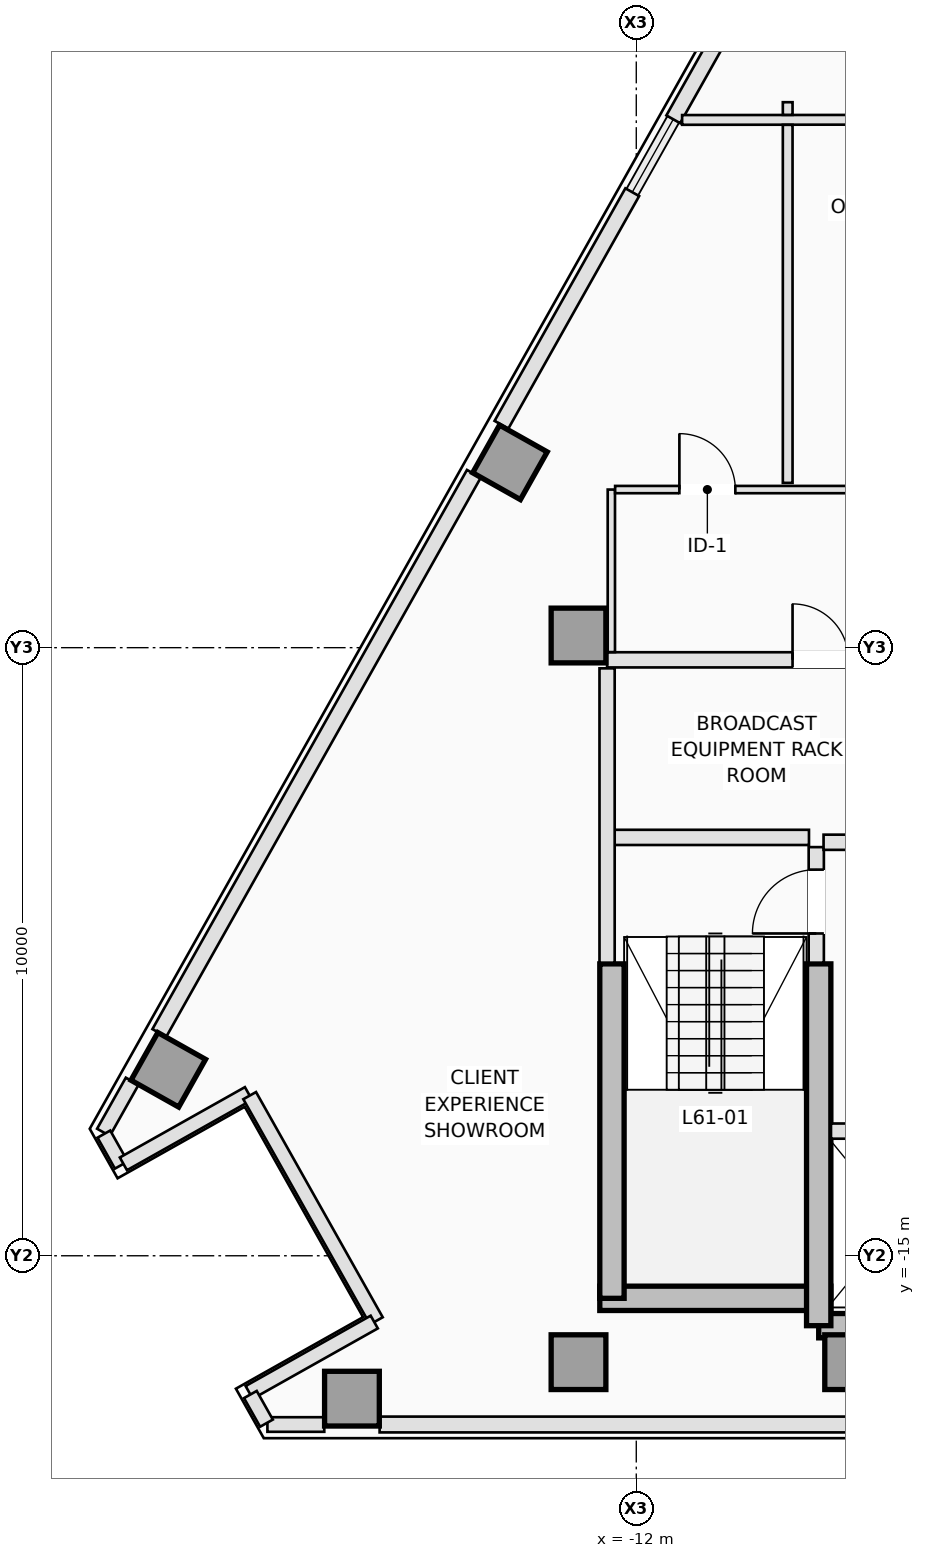
"""IFC4 building model, lengths in metres.
Left out: names, types, materials, properties, quantities, classifications, styles, units other than length and angle.
Written with IfcOpenShell. Run it as: python <this file> out.ifc"""

import sys

from ifc_helpers import new_model, si_unit, direction, frame, frame_2d, origin, origin_2d, place, context, subcontext, project, spatial, rectangle, extrude, element, fill, save


model = new_model("IFC4")
c1 = context("Model", 3, precision=1e-05, world=origin(), true_north=direction((0.0, 1.0)))
c2 = subcontext(c1, "Body", "Model", "MODEL_VIEW")
j1 = project(units=[si_unit("LENGTHUNIT", "METRE"), si_unit("PLANEANGLEUNIT", "RADIAN")], contexts=[c1])
p1 = place(None, origin())
s1 = spatial("IfcSite", under=j1, at=p1, CompositionType="ELEMENT")
p2 = place(p1, origin())
s2 = spatial("IfcBuilding", under=s1, at=p2, CompositionType="ELEMENT")
p3 = place(p2, frame((0.0, 0.0, 221.9)))
s3 = spatial("IfcBuildingStorey", under=s2, at=p3, CompositionType="ELEMENT", Elevation=221.9)
p4 = place(p3, frame((-12.6, -15.7, 0.0), z_axis=(0.0, 0.0, 1.0), x_axis=(1.0, 0.0, 0.0)))
e1 = element("IfcWall", 1, at=p4, inside=s3, PredefinedType="SHEAR", context=c2, shape_type="SweptSolid", body=[
    extrude(rectangle(XDim=3.8, YDim=0.4, at=frame_2d((1.9, 0.0))), origin(), (0.0, 0.0, 1.0), 3.5),
])
p5 = place(p3, frame((-9.0, -16.15, 0.0), z_axis=(0.0, 0.0, 1.0), x_axis=(1.0, 0.0, 0.0)))
e2 = element("IfcWall", 2, at=p5, inside=s3, PredefinedType="SHEAR", context=c2, shape_type="SweptSolid", body=[
    extrude(rectangle(XDim=5.25, YDim=0.4, at=frame_2d((2.625, 0.0))), origin(), (0.0, 0.0, 1.0), 3.5),
])
p6 = place(p3, frame((-12.4, -15.7, 0.0), z_axis=(0.0, 0.0, 1.0), x_axis=(0.0, 1.0, 0.0)))
e3 = element("IfcWall", 3, at=p6, inside=s3, PredefinedType="SHEAR", context=c2, shape_type="SweptSolid", body=[
    extrude(rectangle(XDim=5.5, YDim=0.4, at=frame_2d((2.75, 0.0))), origin(), (0.0, 0.0, 1.0), 3.5),
])
p7 = place(p3, frame((-9.0, -16.15, 0.0), z_axis=(0.0, 0.0, 1.0), x_axis=(0.0, 1.0, 0.0)))
e4 = element("IfcWall", 4, at=p7, inside=s3, PredefinedType="SHEAR", context=c2, shape_type="SweptSolid", body=[
    extrude(rectangle(XDim=5.95, YDim=0.4, at=frame_2d((2.975, 0.0))), origin(), (0.0, 0.0, 1.0), 3.5),
])
for number, where, z_axis, x_axis in (
    (5, (-12.95, -16.75, 0.0), (0.0, 0.0, 1.0), (1.0, 0.0, 0.0)),
    (6, (-8.45, -16.75, 0.0), (0.0, 0.0, 1.0), (1.0, 0.0, 0.0)),
    (7, (-12.95, -4.8, 0.0), (0.0, 0.0, 1.0), (1.0, 0.0, 0.0)),
    (8, (-16.676, -17.35, 0.0), (0.0, 0.0, 1.0), (0.0, 1.0, 0.0)),
    (9, (-14.077, -1.952, 0.0), (0.0, 0.0, 1.0), (-0.872, 0.49, 0.0)),
    (10, (-19.697, -11.942, 0.0), (0.0, 0.0, 1.0), (-0.872, 0.49, 0.0)),
):
    element("IfcColumn", number, at=place(p3, frame(where, z_axis=z_axis, x_axis=x_axis)), inside=s3, PredefinedType="COLUMN", context=c2, shape_type="SweptSolid", body=[
        extrude(rectangle(XDim=0.9, YDim=0.9, at=origin_2d()), origin(), (0.0, 0.0, 1.0), 3.5),
    ])
p8 = place(p3, frame((-17.131, -17.775, 0.0), z_axis=(0.0, 0.0, 1.0), x_axis=(-1.0, 0.0, 0.0)))
e11 = element("IfcWall", 11, at=p8, inside=s3, PredefinedType="STANDARD", context=c2, shape_type="SweptSolid", body=[
    extrude(rectangle(XDim=0.935, YDim=0.24, at=frame_2d((0.468, 0.0))), origin(), (0.0, 0.0, 1.0), 3.25),
])
p9 = place(p3, frame((-5.893, -17.775, 0.0), z_axis=(0.0, 0.0, 1.0), x_axis=(-1.0, 0.0, 0.0)))
e12 = element("IfcWall", 12, at=p9, inside=s3, PredefinedType="STANDARD", context=c2, shape_type="SweptSolid", body=[
    extrude(rectangle(XDim=10.328, YDim=0.26, at=frame_2d((5.164, 0.0))), origin(), (0.0, 0.0, 1.0), 3.25),
])
p10 = place(p3, frame((-20.762, -12.97, 0.0), z_axis=(0.0, 0.0, 1.0), x_axis=(0.490345412687, 0.87152818443, 0.0)))
e13 = element("IfcWall", 13, at=p10, inside=s3, PredefinedType="STANDARD", context=c2, shape_type="SweptSolid", body=[
    extrude(rectangle(XDim=0.964, YDim=0.24, at=frame_2d((0.482, 0.0))), origin(), (0.0, 0.0, 1.0), 3.25),
])
p11 = place(p3, frame((-19.844, -11.337, 0.0), z_axis=(0.0, 0.0, 1.0), x_axis=(0.490246958575, 0.871583570066, 0.0)))
e14 = element("IfcWall", 14, at=p11, inside=s3, PredefinedType="STANDARD", context=c2, shape_type="SweptSolid", body=[
    extrude(rectangle(XDim=10.552, YDim=0.26, at=frame_2d((5.276, 0.0))), origin(), (0.0, 0.0, 1.0), 3.25),
])
p12 = place(p3, frame((-14.217, -1.334, 0.0), z_axis=(0.0, 0.0, 1.0), x_axis=(0.490261239633, 0.871575537125, 0.0)))
e15 = element("IfcWall", 15, at=p12, inside=s3, PredefinedType="STANDARD", context=c2, shape_type="SweptSolid", body=[
    extrude(rectangle(XDim=4.388, YDim=0.26, at=frame_2d((2.194, 0.0))), origin(), (0.0, 0.0, 1.0), 3.25),
])
p13 = place(p3, frame((-11.392, 3.689, 0.0), z_axis=(0.0, 0.0, 1.0), x_axis=(0.490237464814, 0.871588910033, 0.0)))
e16 = element("IfcWall", 16, at=p13, inside=s3, PredefinedType="STANDARD", context=c2, shape_type="SweptSolid", body=[
    extrude(rectangle(XDim=4.388, YDim=0.26, at=frame_2d((2.194, 0.0))), origin(), (0.0, 0.0, 1.0), 3.25),
])
p14 = place(p3, frame((-20.755, -12.999, 0.0), z_axis=(0.0, 0.0, 1.0), x_axis=(0.490320776404, -0.871542045014, 0.0)))
e17 = element("IfcWall", 17, at=p14, inside=s3, PredefinedType="STANDARD", context=c2, shape_type="SweptSolid", body=[
    extrude(rectangle(XDim=0.584, YDim=0.24, at=frame_2d((0.292, 0.0))), origin(), (0.0, 0.0, 1.0), 3.25),
])
p15 = place(p3, frame((-20.434, -13.489, 0.0), z_axis=(0.0, 0.0, 1.0), x_axis=(0.871578299909, 0.490256327984, 0.0)))
e18 = element("IfcWall", 18, at=p15, inside=s3, PredefinedType="STANDARD", context=c2, shape_type="SweptSolid", body=[
    extrude(rectangle(XDim=2.36, YDim=0.24, at=frame_2d((1.18, 0.0))), origin(), (0.0, 0.0, 1.0), 3.25),
])
p16 = place(p3, frame((-18.358, -12.366, 0.0), z_axis=(0.0, 0.0, 1.0), x_axis=(0.49027487746, -0.871567865706, 0.0)))
e19 = element("IfcWall", 19, at=p16, inside=s3, PredefinedType="STANDARD", context=c2, shape_type="SweptSolid", body=[
    extrude(rectangle(XDim=4.25, YDim=0.24, at=frame_2d((2.125, 0.0))), origin(), (0.0, 0.0, 1.0), 2.722),
])
p17 = place(p3, frame((-16.309, -16.09, 0.0), z_axis=(0.0, 0.0, 1.0), x_axis=(-0.871578299909, -0.490256327984, 0.0)))
e20 = element("IfcWall", 20, at=p17, inside=s3, PredefinedType="STANDARD", context=c2, shape_type="SweptSolid", body=[
    extrude(rectangle(XDim=2.36, YDim=0.24, at=frame_2d((1.18, 0.0))), origin(), (0.0, 0.0, 1.0), 3.25),
])
p18 = place(p3, frame((-18.346, -17.282, 0.0), z_axis=(0.0, 0.0, 1.0), x_axis=(0.49038986747, -0.87150317147, 0.0)))
e21 = element("IfcWall", 21, at=p18, inside=s3, PredefinedType="STANDARD", context=c2, shape_type="SweptSolid", body=[
    extrude(rectangle(XDim=0.541, YDim=0.24, at=frame_2d((0.271, 0.0))), origin(), (0.0, 0.0, 1.0), 3.25),
])
p19 = place(p3, frame((-9.04, -10.18, 0.0), z_axis=(0.0, 0.0, 1.0), x_axis=(0.0, 1.0, 0.0)))
e22 = element("IfcWall", 22, at=p19, inside=s3, PredefinedType="PARTITIONING", context=c2, shape_type="SweptSolid", body=[
    extrude(rectangle(XDim=1.9, YDim=0.25, at=frame_2d((0.95, 0.0))), origin(), (0.0, 0.0, 1.0), 3.25),
])
p20 = place(p19, frame((0.48, 0.0, 0.0)))
e23 = element("IfcOpeningElement", 23, at=p20, cuts=e22, PredefinedType="OPENING", context=c2, shape_type="SweptSolid", body=[
    extrude(rectangle(XDim=1.05, YDim=2.15, at=frame_2d((0.525, 1.075))), frame((0.0, 0.135, 0.0), z_axis=(0.0, -1.0, 0.0), x_axis=(1.0, 0.0, 0.0)), (0.0, 0.0, 1.0), 0.27),
])
p21 = place(p3, frame((-12.38, -8.12, 0.0), z_axis=(0.0, 0.0, 1.0), x_axis=(1.0, 0.0, 0.0)))
e24 = element("IfcWall", 24, at=p21, inside=s3, PredefinedType="PARTITIONING", context=c2, shape_type="SweptSolid", body=[
    extrude(rectangle(XDim=3.22, YDim=0.25, at=frame_2d((1.61, 0.0))), origin(), (0.0, 0.0, 1.0), 3.25),
])
p22 = place(p3, frame((-12.48, -10.18, 0.0), z_axis=(0.0, 0.0, 1.0), x_axis=(0.0, 1.0, 0.0)))
e25 = element("IfcWall", 25, at=p22, inside=s3, PredefinedType="PARTITIONING", context=c2, shape_type="SweptSolid", body=[
    extrude(rectangle(XDim=4.84, YDim=0.25, at=frame_2d((2.42, 0.0))), origin(), (0.0, 0.0, 1.0), 3.25),
])
p23 = place(p3, frame((-8.798, -12.95, 0.0), z_axis=(0.0, 0.0, 1.0), x_axis=(1.0, 0.0, 0.0)))
e26 = element("IfcWall", 26, at=p23, inside=s3, PredefinedType="PARTITIONING", context=c2, shape_type="SweptSolid", body=[
    extrude(rectangle(XDim=5.118, YDim=0.25, at=frame_2d((2.559, 0.0))), origin(), (0.0, 0.0, 1.0), 3.25),
])
p24 = place(p23, frame((0.698, 0.0, 0.0)))
e27 = element("IfcOpeningElement", 27, at=p24, cuts=e26, PredefinedType="OPENING", context=c2, shape_type="SweptSolid", body=[
    extrude(rectangle(XDim=1.1, YDim=2.15, at=frame_2d((0.55, 1.075))), frame((0.0, 0.135, 0.0), z_axis=(0.0, -1.0, 0.0), x_axis=(1.0, 0.0, 0.0)), (0.0, 0.0, 1.0), 0.27),
])
p25 = place(p23, frame((2.598, 0.0, 0.0)))
e28 = element("IfcOpeningElement", 28, at=p25, cuts=e26, PredefinedType="OPENING", context=c2, shape_type="SweptSolid", body=[
    extrude(rectangle(XDim=0.88, YDim=2.1, at=frame_2d((0.44, 1.05))), frame((0.0, 0.135, 0.0), z_axis=(0.0, -1.0, 0.0), x_axis=(1.0, 0.0, 0.0)), (0.0, 0.0, 1.0), 0.27),
])
p26 = place(p23, frame((3.998, 0.0, 0.0)))
e29 = element("IfcOpeningElement", 29, at=p26, cuts=e26, PredefinedType="OPENING", context=c2, shape_type="SweptSolid", body=[
    extrude(rectangle(XDim=0.88, YDim=2.1, at=frame_2d((0.44, 1.05))), frame((0.0, 0.135, 0.0), z_axis=(0.0, -1.0, 0.0), x_axis=(1.0, 0.0, 0.0)), (0.0, 0.0, 1.0), 0.27),
])
p27 = place(p3, frame((-8.92, -8.2, 0.0), z_axis=(0.0, 0.0, 1.0), x_axis=(1.0, 0.0, 0.0)))
e30 = element("IfcWall", 30, at=p27, inside=s3, PredefinedType="PARTITIONING", context=c2, shape_type="SweptSolid", body=[
    extrude(rectangle(XDim=5.24, YDim=0.25, at=frame_2d((2.62, 0.0))), origin(), (0.0, 0.0, 1.0), 3.25),
])
p28 = place(p3, frame((-12.48, -5.2, 0.0), z_axis=(0.0, 0.0, 1.0), x_axis=(1.0, 0.0, 0.0)))
e31 = element("IfcWall", 31, at=p28, inside=s3, PredefinedType="PARTITIONING", context=c2, shape_type="SweptSolid", body=[
    extrude(rectangle(XDim=8.278, YDim=0.25, at=frame_2d((4.139, 0.0))), origin(), (0.0, 0.0, 1.0), 3.25),
])
p29 = place(p28, frame((3.05, 0.0, 0.0)))
e32 = element("IfcOpeningElement", 32, at=p29, cuts=e31, PredefinedType="OPENING", context=c2, shape_type="SweptSolid", body=[
    extrude(rectangle(XDim=0.92, YDim=2.12, at=frame_2d((0.46, 1.06))), frame((0.0, 0.135, 0.0), z_axis=(0.0, -1.0, 0.0), x_axis=(1.0, 0.0, 0.0)), (0.0, 0.0, 1.0), 0.27),
])
p30 = place(p28, frame((6.15, 0.0, 0.0)))
e33 = element("IfcOpeningElement", 33, at=p30, cuts=e31, PredefinedType="OPENING", context=c2, shape_type="SweptSolid", body=[
    extrude(rectangle(XDim=0.92, YDim=2.12, at=frame_2d((0.46, 1.06))), frame((0.0, 0.135, 0.0), z_axis=(0.0, -1.0, 0.0), x_axis=(1.0, 0.0, 0.0)), (0.0, 0.0, 1.0), 0.27),
])
p31 = place(p3, frame((-12.41, -5.073, 0.0), z_axis=(0.0, 0.0, 1.0), x_axis=(0.0, 1.0, 0.0)))
e34 = element("IfcWall", 34, at=p31, inside=s3, PredefinedType="PARTITIONING", context=c2, shape_type="SweptSolid", body=[
    extrude(rectangle(XDim=2.673, YDim=0.12, at=frame_2d((1.336, 0.0))), origin(), (0.0, 0.0, 1.0), 3.25),
])
p32 = place(p3, frame((-12.348, -2.4, 0.0), z_axis=(0.0, 0.0, 1.0), x_axis=(1.0, 0.0, 0.0)))
e35 = element("IfcWall", 35, at=p32, inside=s3, PredefinedType="PARTITIONING", context=c2, shape_type="SweptSolid", body=[
    extrude(rectangle(XDim=5.786, YDim=0.12, at=frame_2d((2.893, 0.0))), origin(), (0.0, 0.0, 1.0), 3.25),
])
p33 = place(p32, frame((3.863, 0.0, 0.0)))
e36 = element("IfcOpeningElement", 36, at=p33, cuts=e35, PredefinedType="OPENING", context=c2, shape_type="SweptSolid", body=[
    extrude(rectangle(XDim=0.92, YDim=2.12, at=frame_2d((0.46, 1.06))), frame((0.0, 0.07, 0.0), z_axis=(0.0, -1.0, 0.0), x_axis=(1.0, 0.0, 0.0)), (0.0, 0.0, 1.0), 0.14),
])
p34 = place(p32, frame((1.057, 0.0, 0.0)))
e37 = element("IfcOpeningElement", 37, at=p34, cuts=e35, PredefinedType="OPENING", context=c2, shape_type="SweptSolid", body=[
    extrude(rectangle(XDim=0.92, YDim=2.12, at=frame_2d((0.46, 1.06))), frame((0.0, 0.07, 0.0), z_axis=(0.0, -1.0, 0.0), x_axis=(1.0, 0.0, 0.0)), (0.0, 0.0, 1.0), 0.14),
])
p35 = place(p3, frame((-4.92, 3.684, 0.0), z_axis=(0.0, 0.0, 1.0), x_axis=(-0.999999702129, -0.000771842932, 0.0)))
e38 = element("IfcWall", 38, at=p35, inside=s3, PredefinedType="PARTITIONING", context=c2, shape_type="SweptSolid", body=[
    extrude(rectangle(XDim=6.326, YDim=0.16, at=frame_2d((3.163, 0.0))), origin(), (0.0, 0.0, 1.0), 2.943),
])
p36 = place(p3, frame((-9.51, -2.29, 0.0), z_axis=(0.0, 0.0, 1.0), x_axis=(0.0, 1.0, 0.0)))
e39 = element("IfcWall", 39, at=p36, inside=s3, PredefinedType="PARTITIONING", context=c2, shape_type="SweptSolid", body=[
    extrude(rectangle(XDim=5.888, YDim=0.16, at=frame_2d((2.944, 0.0))), origin(), (0.0, 0.0, 1.0), 3.25),
])
p37 = place(p3, frame((-9.51, 3.762, 0.0), z_axis=(0.0, 0.0, 1.0), x_axis=(0.0, 1.0, 0.0)))
e40 = element("IfcWall", 40, at=p37, inside=s3, PredefinedType="PARTITIONING", context=c2, shape_type="SweptSolid", body=[
    extrude(rectangle(XDim=0.208, YDim=0.16, at=frame_2d((0.104, 0.0))), origin(), (0.0, 0.0, 1.0), 3.25),
])
p38 = place(p20, origin())
e41 = element("IfcDoor", 41, at=p38, inside=s3, OperationType="SINGLE_SWING_LEFT", PredefinedType="DOOR", context=c2, shape_type="SweptSolid", body=[
    extrude(rectangle(XDim=1.05, YDim=2.15, at=frame_2d((0.525, 1.075))), frame((0.0, 0.025, 0.0), z_axis=(0.0, -1.0, 0.0), x_axis=(1.0, 0.0, 0.0)), (0.0, 0.0, 1.0), 0.05),
])
fill(e23, e41)
p39 = place(p29, origin())
e42 = element("IfcDoor", 42, at=p39, inside=s3, OperationType="SINGLE_SWING_LEFT", PredefinedType="DOOR", context=c2, shape_type="SweptSolid", body=[
    extrude(rectangle(XDim=0.92, YDim=2.12, at=frame_2d((0.46, 1.06))), frame((0.0, 0.025, 0.0), z_axis=(0.0, -1.0, 0.0), x_axis=(1.0, 0.0, 0.0)), (0.0, 0.0, 1.0), 0.05),
])
fill(e32, e42)
p40 = place(p34, origin())
e43 = element("IfcDoor", 43, at=p40, inside=s3, OperationType="SINGLE_SWING_LEFT", PredefinedType="DOOR", context=c2, shape_type="SweptSolid", body=[
    extrude(rectangle(XDim=0.92, YDim=2.12, at=frame_2d((0.46, 1.06))), frame((0.0, 0.025, 0.0), z_axis=(0.0, -1.0, 0.0), x_axis=(1.0, 0.0, 0.0)), (0.0, 0.0, 1.0), 0.05),
])
fill(e37, e43)
save(model, sys.argv[1])
